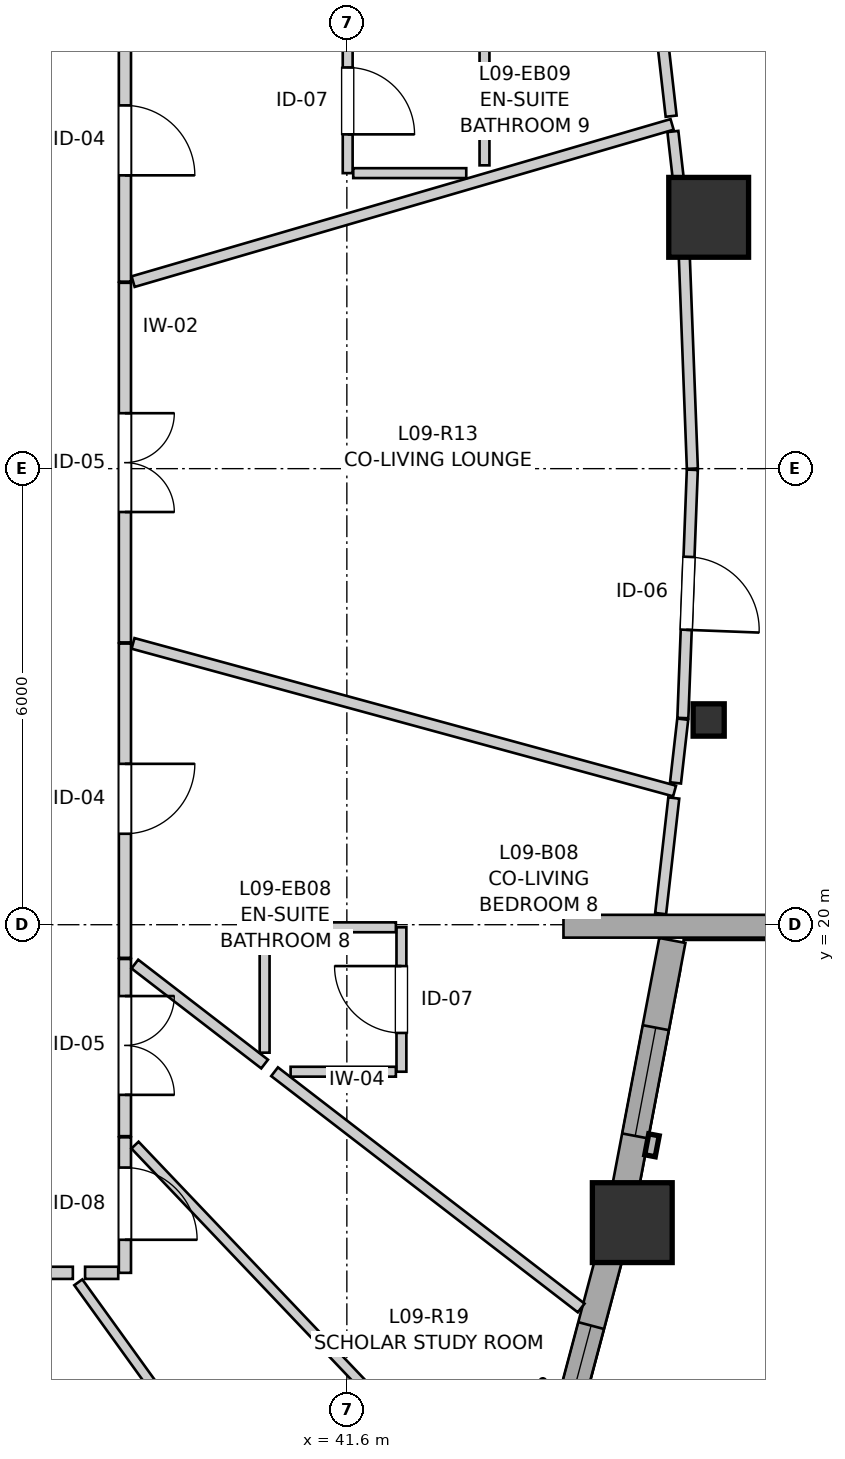
"""IFC4 building model, lengths in metres.
Left out: names, types, materials, properties, quantities, classifications, styles, units other than length and angle.
Written with IfcOpenShell. Run it as: python <this file> out.ifc"""

import sys

from ifc_helpers import new_model, si_unit, direction, frame, frame_2d, origin, origin_2d, place, context, subcontext, project, spatial, rectangle, i_section, extrude, source, transform, mapped, element, fill, save


model = new_model("IFC4")
c1 = context("Model", 3, precision=1e-05, world=origin(), true_north=direction((0.0, 1.0)))
c2 = subcontext(c1, "Body", "Model", "MODEL_VIEW")
j1 = project(units=[si_unit("LENGTHUNIT", "METRE"), si_unit("PLANEANGLEUNIT", "RADIAN")], contexts=[c1])
p1 = place(None, origin())
s1 = spatial("IfcSite", under=j1, at=p1, CompositionType="ELEMENT")
p2 = place(p1, origin())
s2 = spatial("IfcBuilding", under=s1, at=p2, CompositionType="ELEMENT")
p3 = place(p2, frame((0.0, 0.0, 33.4)))
s3 = spatial("IfcBuildingStorey", under=s2, at=p3, CompositionType="ELEMENT", Elevation=33.4)
m1 = source(origin(), c2, "Body", "SweptSolid", [
    extrude(rectangle(XDim=1.05, YDim=1.05, at=origin_2d()), origin(), (0.0, 0.0, 1.0), 2.94),
])
p4 = place(p3, frame((45.355, 16.081, 0.0), z_axis=(0.0, 0.0, 1.0), x_axis=(1.0, 0.0, 0.0)))
e1 = element("IfcColumn", 1, at=p4, inside=s3, PredefinedType="COLUMN", context=c2, shape_type="MappedRepresentation", body=[
    mapped(m1, transform((0.0, 0.0, 0.0), x_axis=(1.0, 0.0, 0.0), y_axis=(0.0, 1.0, 0.0), z_axis=(0.0, 0.0, 1.0), scale=1.0)),
])
m2 = source(origin(), c2, "Body", "SweptSolid", [
    extrude(i_section(OverallWidth=0.409, OverallDepth=0.425, WebThickness=0.03, FlangeThickness=0.048, FilletRadius=0.015, at=origin_2d()), origin(), (0.0, 0.0, 1.0), 2.94),
])
p5 = place(p3, frame((46.361, 22.694, 0.0), z_axis=(0.0, 0.0, 1.0), x_axis=(1.0, 0.0, 0.0)))
e2 = element("IfcColumn", 2, at=p5, inside=s3, PredefinedType="PILASTER", context=c2, shape_type="MappedRepresentation", body=[
    mapped(m2, transform((0.0, 0.0, 0.0), x_axis=(1.0, 0.0, 0.0), y_axis=(0.0, 1.0, 0.0), z_axis=(0.0, 0.0, 1.0), scale=1.0)),
])
p6 = place(p3, frame((46.361, 29.306, 0.0), z_axis=(0.0, 0.0, 1.0), x_axis=(1.0, 0.0, 0.0)))
e3 = element("IfcColumn", 3, at=p6, inside=s3, PredefinedType="COLUMN", context=c2, shape_type="MappedRepresentation", body=[
    mapped(m1, transform((0.0, 0.0, 0.0), x_axis=(1.0, 0.0, 0.0), y_axis=(0.0, 1.0, 0.0), z_axis=(0.0, 0.0, 1.0), scale=1.0)),
])
p7 = place(p3, frame((44.297, 12.782, 0.0), z_axis=(0.0, 0.0, 1.0), x_axis=(0.257090265476, 0.96638739406, 0.0)))
e4 = element("IfcWall", 4, at=p7, inside=s3, PredefinedType="SOLIDWALL", context=c2, shape_type="SweptSolid", body=[
    extrude(rectangle(XDim=3.159, YDim=0.35, at=frame_2d((1.58, 0.0))), origin(), (0.0, 0.0, 1.0), 2.42),
])
p8 = place(p7, frame((0.261, 0.0, 0.82)))
e5 = element("IfcOpeningElement", 5, at=p8, cuts=e4, PredefinedType="OPENING", context=c2, shape_type="SweptSolid", body=[
    extrude(rectangle(XDim=1.75, YDim=1.3, at=frame_2d((0.875, 0.65))), frame((0.0, 0.185, 0.0), z_axis=(0.0, -1.0, 0.0), x_axis=(1.0, 0.0, 0.0)), (0.0, 0.0, 1.0), 0.37),
])
p9 = place(p3, frame((45.24, 16.408, 0.0), z_axis=(0.0, 0.0, 1.0), x_axis=(0.186636709983, 0.982428999209, 0.0)))
e6 = element("IfcWall", 6, at=p9, inside=s3, PredefinedType="SOLIDWALL", context=c2, shape_type="SweptSolid", body=[
    extrude(rectangle(XDim=3.446, YDim=0.35, at=frame_2d((1.723, 0.0))), origin(), (0.0, 0.0, 1.0), 2.42),
])
p10 = place(p9, frame((0.828, 0.0, 0.82)))
e7 = element("IfcOpeningElement", 7, at=p10, cuts=e6, PredefinedType="OPENING", context=c2, shape_type="SweptSolid", body=[
    extrude(rectangle(XDim=1.45, YDim=1.25, at=frame_2d((0.725, 0.625))), frame((0.0, 0.185, 0.0), z_axis=(0.0, -1.0, 0.0), x_axis=(1.0, 0.0, 0.0)), (0.0, 0.0, 1.0), 0.37),
])
p11 = place(p3, frame((44.45, 19.98, 0.0), z_axis=(0.0, 0.0, 1.0), x_axis=(1.0, 0.0, 0.0)))
e8 = element("IfcWall", 8, at=p11, inside=s3, PredefinedType="SOLIDWALL", context=c2, shape_type="SweptSolid", body=[
    extrude(rectangle(XDim=20.685, YDim=0.3, at=frame_2d((10.342, 0.0))), origin(), (0.0, 0.0, 1.0), 2.12),
])
p12 = place(p3, frame((38.68, 28.445, 0.0), z_axis=(0.0, 0.0, 1.0), x_axis=(0.0, -1.0, 0.0)))
e9 = element("IfcWall", 9, at=p12, inside=s3, PredefinedType="PARTITIONING", context=c2, shape_type="SweptSolid", body=[
    extrude(rectangle(XDim=4.731, YDim=0.16, at=frame_2d((2.365, 0.0))), origin(), (0.0, 0.0, 1.0), 2.94),
])
p13 = place(p12, frame((1.716, 0.0, 0.0)))
e10 = element("IfcOpeningElement", 10, at=p13, cuts=e9, PredefinedType="OPENING", context=c2, shape_type="SweptSolid", body=[
    extrude(rectangle(XDim=1.3, YDim=2.1, at=frame_2d((0.65, 1.05))), frame((0.0, 0.09, 0.0), z_axis=(0.0, -1.0, 0.0), x_axis=(1.0, 0.0, 0.0)), (0.0, 0.0, 1.0), 0.18),
])
p14 = place(p3, frame((38.68, 23.699, 0.0), z_axis=(0.0, 0.0, 1.0), x_axis=(0.0, -1.0, 0.0)))
e11 = element("IfcWall", 11, at=p14, inside=s3, PredefinedType="PARTITIONING", context=c2, shape_type="SweptSolid", body=[
    extrude(rectangle(XDim=4.135, YDim=0.16, at=frame_2d((2.067, 0.0))), origin(), (0.0, 0.0, 1.0), 2.94),
])
p15 = place(p14, frame((1.583, 0.0, 0.0)))
e12 = element("IfcOpeningElement", 12, at=p15, cuts=e11, PredefinedType="OPENING", context=c2, shape_type="SweptSolid", body=[
    extrude(rectangle(XDim=0.92, YDim=2.1, at=frame_2d((0.46, 1.05))), frame((0.0, 0.09, 0.0), z_axis=(0.0, -1.0, 0.0), x_axis=(1.0, 0.0, 0.0)), (0.0, 0.0, 1.0), 0.18),
])
p16 = place(p3, frame((38.68, 32.175, 0.0), z_axis=(0.0, 0.0, 1.0), x_axis=(0.0, -1.0, 0.0)))
e13 = element("IfcWall", 13, at=p16, inside=s3, PredefinedType="PARTITIONING", context=c2, shape_type="SweptSolid", body=[
    extrude(rectangle(XDim=3.715, YDim=0.16, at=frame_2d((1.857, 0.0))), origin(), (0.0, 0.0, 1.0), 2.94),
])
p17 = place(p16, frame((1.396, 0.0, 0.0)))
e14 = element("IfcOpeningElement", 14, at=p17, cuts=e13, PredefinedType="OPENING", context=c2, shape_type="SweptSolid", body=[
    extrude(rectangle(XDim=0.92, YDim=2.1, at=frame_2d((0.46, 1.05))), frame((0.0, 0.09, 0.0), z_axis=(0.0, -1.0, 0.0), x_axis=(1.0, 0.0, 0.0)), (0.0, 0.0, 1.0), 0.18),
])
p18 = place(p3, frame((46.146, 25.985, 0.0), z_axis=(0.0, 0.0, 1.0), x_axis=(-0.038094618751, -0.999274136572, 0.0)))
e15 = element("IfcWall", 15, at=p18, inside=s3, PredefinedType="PARTITIONING", context=c2, shape_type="SweptSolid", body=[
    extrude(rectangle(XDim=3.269, YDim=0.145, at=frame_2d((1.634, 0.0))), origin(), (0.0, 0.0, 1.0), 2.408),
])
p19 = place(p18, frame((1.147, 0.0, 0.0)))
e16 = element("IfcOpeningElement", 16, at=p19, cuts=e15, PredefinedType="OPENING", context=c2, shape_type="SweptSolid", body=[
    extrude(rectangle(XDim=0.96, YDim=2.1, at=frame_2d((0.48, 1.05))), frame((0.0, 0.083, 0.0), z_axis=(0.0, -1.0, 0.0), x_axis=(1.0, 0.0, 0.0)), (0.0, 0.0, 1.0), 0.165),
])
p20 = place(p3, frame((37.995, 15.42, 0.0), z_axis=(0.0, 0.0, 1.0), x_axis=(-1.0, 0.0, 0.0)))
e17 = element("IfcWall", 17, at=p20, inside=s3, PredefinedType="PARTITIONING", context=c2, shape_type="SweptSolid", body=[
    extrude(rectangle(XDim=2.9, YDim=0.16, at=frame_2d((1.45, 0.0))), origin(), (0.0, 0.0, 1.0), 2.94),
])
p21 = place(p20, frame((1.014, 0.0, 0.0)))
e18 = element("IfcOpeningElement", 18, at=p21, cuts=e17, PredefinedType="OPENING", context=c2, shape_type="SweptSolid", body=[
    extrude(rectangle(XDim=0.92, YDim=2.1, at=frame_2d((0.46, 1.05))), frame((0.0, 0.09, 0.0), z_axis=(0.0, -1.0, 0.0), x_axis=(1.0, 0.0, 0.0)), (0.0, 0.0, 1.0), 0.18),
])
p22 = place(p3, frame((38.68, 19.549, 0.0), z_axis=(0.0, 0.0, 1.0), x_axis=(0.0, -1.0, 0.0)))
e19 = element("IfcWall", 19, at=p22, inside=s3, PredefinedType="PARTITIONING", context=c2, shape_type="SweptSolid", body=[
    extrude(rectangle(XDim=2.331, YDim=0.16, at=frame_2d((1.166, 0.0))), origin(), (0.0, 0.0, 1.0), 2.94),
])
p23 = place(p22, frame((0.488, 0.0, 0.0)))
e20 = element("IfcOpeningElement", 20, at=p23, cuts=e19, PredefinedType="OPENING", context=c2, shape_type="SweptSolid", body=[
    extrude(rectangle(XDim=1.3, YDim=2.1, at=frame_2d((0.65, 1.05))), frame((0.0, 0.09, 0.0), z_axis=(0.0, -1.0, 0.0), x_axis=(1.0, 0.0, 0.0)), (0.0, 0.0, 1.0), 0.18),
])
p24 = place(p3, frame((42.318, 18.066, 0.0), z_axis=(0.0, 0.0, 1.0), x_axis=(0.0, 1.0, 0.0)))
e21 = element("IfcWall", 21, at=p24, inside=s3, PredefinedType="PARTITIONING", context=c2, shape_type="SweptSolid", body=[
    extrude(rectangle(XDim=1.9, YDim=0.13, at=frame_2d((0.95, 0.0))), origin(), (0.0, 0.0, 1.0), 2.94),
])
p25 = place(p24, frame((0.51, 0.0, 0.0)))
e22 = element("IfcOpeningElement", 22, at=p25, cuts=e21, PredefinedType="OPENING", context=c2, shape_type="SweptSolid", body=[
    extrude(rectangle(XDim=0.88, YDim=2.05, at=frame_2d((0.44, 1.025))), frame((0.0, 0.075, 0.0), z_axis=(0.0, -1.0, 0.0), x_axis=(1.0, 0.0, 0.0)), (0.0, 0.0, 1.0), 0.15),
])
p26 = place(p3, frame((41.611, 31.788, 0.0), z_axis=(0.0, 0.0, 1.0), x_axis=(0.0, -1.0, 0.0)))
e23 = element("IfcWall", 23, at=p26, inside=s3, PredefinedType="PARTITIONING", context=c2, shape_type="SweptSolid", body=[
    extrude(rectangle(XDim=1.9, YDim=0.13, at=frame_2d((0.95, 0.0))), origin(), (0.0, 0.0, 1.0), 2.94),
])
p27 = place(p26, frame((0.51, 0.0, 0.0)))
e24 = element("IfcOpeningElement", 24, at=p27, cuts=e23, PredefinedType="OPENING", context=c2, shape_type="SweptSolid", body=[
    extrude(rectangle(XDim=0.88, YDim=2.05, at=frame_2d((0.44, 1.025))), frame((0.0, 0.075, 0.0), z_axis=(0.0, -1.0, 0.0), x_axis=(1.0, 0.0, 0.0)), (0.0, 0.0, 1.0), 0.15),
])
p28 = place(p3, frame((38.68, 17.203, 0.0), z_axis=(0.0, 0.0, 1.0), x_axis=(0.0, -1.0, 0.0)))
e25 = element("IfcWall", 25, at=p28, inside=s3, PredefinedType="PARTITIONING", context=c2, shape_type="SweptSolid", body=[
    extrude(rectangle(XDim=1.783, YDim=0.16, at=frame_2d((0.892, 0.0))), origin(), (0.0, 0.0, 1.0), 2.94),
])
p29 = place(p28, frame((0.398, 0.0, 0.0)))
e26 = element("IfcOpeningElement", 26, at=p29, cuts=e25, PredefinedType="OPENING", context=c2, shape_type="SweptSolid", body=[
    extrude(rectangle(XDim=0.95, YDim=2.1, at=frame_2d((0.475, 1.05))), frame((0.0, 0.09, 0.0), z_axis=(0.0, -1.0, 0.0), x_axis=(1.0, 0.0, 0.0)), (0.0, 0.0, 1.0), 0.18),
])
p30 = place(p3, frame((38.067, 15.295, 0.0), z_axis=(0.0, 0.0, 1.0), x_axis=(0.584777320582, -0.811193864211, 0.0)))
e27 = element("IfcWall", 27, at=p30, inside=s3, PredefinedType="PARTITIONING", context=c2, shape_type="SweptSolid", body=[
    extrude(rectangle(XDim=8.164, YDim=0.13, at=frame_2d((4.082, 0.0))), origin(), (0.0, 0.0, 1.0), 2.94),
])
p31 = place(p3, frame((38.788, 28.46, 0.0), z_axis=(0.0, 0.0, 1.0), x_axis=(0.959983709987, 0.280055845432, 0.0)))
e28 = element("IfcWall", 28, at=p31, inside=s3, PredefinedType="PARTITIONING", context=c2, shape_type="SweptSolid", body=[
    extrude(rectangle(XDim=7.386, YDim=0.145, at=frame_2d((3.693, 0.0))), origin(), (0.0, 0.0, 1.0), 2.94),
])
p32 = place(p3, frame((38.787, 23.701, 0.0), z_axis=(0.0, 0.0, 1.0), x_axis=(0.964810342249, -0.262946769308, 0.0)))
e29 = element("IfcWall", 29, at=p32, inside=s3, PredefinedType="PARTITIONING", context=c2, shape_type="SweptSolid", body=[
    extrude(rectangle(XDim=7.385, YDim=0.145, at=frame_2d((3.692, 0.0))), origin(), (0.0, 0.0, 1.0), 2.94),
])
p33 = place(p3, frame((38.812, 17.101, 0.0), z_axis=(0.0, 0.0, 1.0), x_axis=(0.689140556814, -0.724627692649, 0.0)))
e30 = element("IfcWall", 30, at=p33, inside=s3, PredefinedType="PARTITIONING", context=c2, shape_type="SweptSolid", body=[
    extrude(rectangle(XDim=7.217, YDim=0.13, at=frame_2d((3.608, 0.0))), origin(), (0.0, 0.0, 1.0), 2.94),
])
p34 = place(p3, frame((40.649, 18.066, 0.0), z_axis=(0.0, 0.0, 1.0), x_axis=(0.792155051101, -0.610319895641, 0.0)))
e31 = element("IfcWall", 31, at=p34, inside=s3, PredefinedType="PARTITIONING", context=c2, shape_type="SweptSolid", body=[
    extrude(rectangle(XDim=5.093, YDim=0.145, at=frame_2d((2.546, 0.0))), origin(), (0.0, 0.0, 1.0), 2.94),
])
p35 = place(p3, frame((46.021, 29.281, 0.0), z_axis=(0.0, 0.0, 1.0), x_axis=(0.038070453861, -0.999275057501, 0.0)))
e32 = element("IfcWall", 32, at=p35, inside=s3, PredefinedType="PARTITIONING", context=c2, shape_type="SweptSolid", body=[
    extrude(rectangle(XDim=3.283, YDim=0.145, at=frame_2d((1.642, 0.0))), origin(), (0.0, 0.0, 1.0), 2.408),
])
p36 = place(p3, frame((38.811, 19.482, 0.0), z_axis=(0.0, 0.0, 1.0), x_axis=(0.792185877025, -0.61027988353, 0.0)))
e33 = element("IfcWall", 33, at=p36, inside=s3, PredefinedType="PARTITIONING", context=c2, shape_type="SweptSolid", body=[
    extrude(rectangle(XDim=2.156, YDim=0.145, at=frame_2d((1.078, 0.0))), origin(), (0.0, 0.0, 1.0), 2.94),
])
p37 = place(p3, frame((43.411, 29.99, 0.0), z_axis=(0.0, 0.0, 1.0), x_axis=(0.0, 1.0, 0.0)))
e34 = element("IfcWall", 34, at=p37, inside=s3, PredefinedType="PARTITIONING", context=c2, shape_type="SweptSolid", body=[
    extrude(rectangle(XDim=1.798, YDim=0.13, at=frame_2d((0.899, 0.0))), origin(), (0.0, 0.0, 1.0), 2.94),
])
p38 = place(p3, frame((41.684, 29.888, 0.0), z_axis=(0.0, 0.0, 1.0), x_axis=(1.0, 0.0, 0.0)))
e35 = element("IfcWall", 35, at=p38, inside=s3, PredefinedType="PARTITIONING", context=c2, shape_type="SweptSolid", body=[
    extrude(rectangle(XDim=1.487, YDim=0.13, at=frame_2d((0.743, 0.0))), origin(), (0.0, 0.0, 1.0), 2.94),
])
p39 = place(p3, frame((40.518, 19.966, 0.0), z_axis=(0.0, 0.0, 1.0), x_axis=(1.0, 0.0, 0.0)))
e36 = element("IfcWall", 36, at=p39, inside=s3, PredefinedType="PARTITIONING", context=c2, shape_type="SweptSolid", body=[
    extrude(rectangle(XDim=1.727, YDim=0.13, at=frame_2d((0.864, 0.0))), origin(), (0.0, 0.0, 1.0), 2.108),
])
p40 = place(p3, frame((40.518, 18.317, 0.0), z_axis=(0.0, 0.0, 1.0), x_axis=(0.0, 1.0, 0.0)))
e37 = element("IfcWall", 37, at=p40, inside=s3, PredefinedType="PARTITIONING", context=c2, shape_type="SweptSolid", body=[
    extrude(rectangle(XDim=1.576, YDim=0.13, at=frame_2d((0.788, 0.0))), origin(), (0.0, 0.0, 1.0), 2.94),
])
p41 = place(p3, frame((40.86, 18.066, 0.0), z_axis=(0.0, 0.0, 1.0), x_axis=(1.0, 0.0, 0.0)))
e38 = element("IfcWall", 38, at=p41, inside=s3, PredefinedType="PARTITIONING", context=c2, shape_type="SweptSolid", body=[
    extrude(rectangle(XDim=1.385, YDim=0.13, at=frame_2d((0.692, 0.0))), origin(), (0.0, 0.0, 1.0), 2.94),
])
p42 = place(p3, frame((45.729, 20.146, 0.0), z_axis=(0.0, 0.0, 1.0), x_axis=(0.113074294354, 0.993586535716, 0.0)))
e39 = element("IfcWall", 39, at=p42, inside=s3, PredefinedType="PARTITIONING", context=c2, shape_type="SweptSolid", body=[
    extrude(rectangle(XDim=1.531, YDim=0.145, at=frame_2d((0.765, 0.0))), origin(), (0.0, 0.0, 1.0), 2.408),
])
p43 = place(p3, frame((45.89, 30.436, 0.0), z_axis=(0.0, 0.0, 1.0), x_axis=(0.113024308153, -0.993592223081, 0.0)))
e40 = element("IfcWall", 40, at=p43, inside=s3, PredefinedType="PARTITIONING", context=c2, shape_type="SweptSolid", body=[
    extrude(rectangle(XDim=1.147, YDim=0.145, at=frame_2d((0.573, 0.0))), origin(), (0.0, 0.0, 1.0), 2.408),
])
p44 = place(p3, frame((45.729, 31.854, 0.0), z_axis=(0.0, 0.0, 1.0), x_axis=(0.112860473391, -0.993610846129, 0.0)))
e41 = element("IfcWall", 41, at=p44, inside=s3, PredefinedType="PARTITIONING", context=c2, shape_type="SweptSolid", body=[
    extrude(rectangle(XDim=1.224, YDim=0.145, at=frame_2d((0.612, 0.0))), origin(), (0.0, 0.0, 1.0), 2.408),
])
p45 = place(p3, frame((45.924, 21.866, 0.0), z_axis=(0.0, 0.0, 1.0), x_axis=(0.112844765803, 0.993612630169, 0.0)))
e42 = element("IfcWall", 42, at=p45, inside=s3, PredefinedType="PARTITIONING", context=c2, shape_type="SweptSolid", body=[
    extrude(rectangle(XDim=0.844, YDim=0.145, at=frame_2d((0.422, 0.0))), origin(), (0.0, 0.0, 1.0), 2.408),
])
p46 = place(p3, frame((38.156, 15.42, 0.0), z_axis=(0.0, 0.0, 1.0), x_axis=(1.0, 0.0, 0.0)))
e43 = element("IfcWall", 43, at=p46, inside=s3, PredefinedType="PARTITIONING", context=c2, shape_type="SweptSolid", body=[
    extrude(rectangle(XDim=0.436, YDim=0.16, at=frame_2d((0.218, 0.0))), origin(), (0.0, 0.0, 1.0), 2.94),
])
m3 = source(origin(), c2, "Body", "SweptSolid", [
    extrude(rectangle(XDim=1.75, YDim=1.3, at=frame_2d((0.875, 0.65))), frame((0.0, 0.03, 0.0), z_axis=(0.0, -1.0, 0.0), x_axis=(1.0, 0.0, 0.0)), (0.0, 0.0, 1.0), 0.06),
])
p47 = place(p8, origin())
e44 = element("IfcWindow", 44, at=p47, inside=s3, PartitioningType="SINGLE_PANEL", PredefinedType="WINDOW", context=c2, shape_type="MappedRepresentation", body=[
    mapped(m3, transform((0.0, 0.0, 0.0), x_axis=(1.0, 0.0, 0.0), y_axis=(0.0, 1.0, 0.0), z_axis=(0.0, 0.0, 1.0), scale=1.0)),
])
fill(e5, e44)
m4 = source(origin(), c2, "Body", "SweptSolid", [
    extrude(rectangle(XDim=1.45, YDim=1.25, at=frame_2d((0.725, 0.625))), frame((0.0, 0.03, 0.0), z_axis=(0.0, -1.0, 0.0), x_axis=(1.0, 0.0, 0.0)), (0.0, 0.0, 1.0), 0.06),
])
p48 = place(p10, origin())
e45 = element("IfcWindow", 45, at=p48, inside=s3, PartitioningType="SINGLE_PANEL", PredefinedType="WINDOW", context=c2, shape_type="MappedRepresentation", body=[
    mapped(m4, transform((0.0, 0.0, 0.0), x_axis=(1.0, 0.0, 0.0), y_axis=(0.0, 1.0, 0.0), z_axis=(0.0, 0.0, 1.0), scale=1.0)),
])
fill(e7, e45)
m5 = source(origin(), c2, "Body", "SweptSolid", [
    extrude(rectangle(XDim=1.3, YDim=2.1, at=frame_2d((0.65, 1.05))), frame((0.0, 0.025, 0.0), z_axis=(0.0, -1.0, 0.0), x_axis=(1.0, 0.0, 0.0)), (0.0, 0.0, 1.0), 0.05),
])
p49 = place(p13, origin())
e46 = element("IfcDoor", 46, at=p49, inside=s3, OperationType="DOUBLE_DOOR_SINGLE_SWING", PredefinedType="DOOR", context=c2, shape_type="MappedRepresentation", body=[
    mapped(m5, transform((0.0, 0.0, 0.0), x_axis=(1.0, 0.0, 0.0), y_axis=(0.0, 1.0, 0.0), z_axis=(0.0, 0.0, 1.0), scale=1.0)),
])
fill(e10, e46)
m6 = source(origin(), c2, "Body", "SweptSolid", [
    extrude(rectangle(XDim=0.92, YDim=2.1, at=frame_2d((0.46, 1.05))), frame((0.0, 0.025, 0.0), z_axis=(0.0, -1.0, 0.0), x_axis=(1.0, 0.0, 0.0)), (0.0, 0.0, 1.0), 0.05),
])
p50 = place(p15, origin())
e47 = element("IfcDoor", 47, at=p50, inside=s3, OperationType="SINGLE_SWING_LEFT", PredefinedType="DOOR", context=c2, shape_type="MappedRepresentation", body=[
    mapped(m6, transform((0.0, 0.0, 0.0), x_axis=(1.0, 0.0, 0.0), y_axis=(0.0, 1.0, 0.0), z_axis=(0.0, 0.0, 1.0), scale=1.0)),
])
fill(e12, e47)
p51 = place(p17, origin())
e48 = element("IfcDoor", 48, at=p51, inside=s3, OperationType="SINGLE_SWING_RIGHT", PredefinedType="DOOR", context=c2, shape_type="MappedRepresentation", body=[
    mapped(m6, transform((0.0, 0.0, 0.0), x_axis=(1.0, 0.0, 0.0), y_axis=(0.0, 1.0, 0.0), z_axis=(0.0, 0.0, 1.0), scale=1.0)),
])
fill(e14, e48)
m7 = source(origin(), c2, "Body", "SweptSolid", [
    extrude(rectangle(XDim=0.96, YDim=2.1, at=frame_2d((0.48, 1.05))), frame((0.0, 0.025, 0.0), z_axis=(0.0, -1.0, 0.0), x_axis=(1.0, 0.0, 0.0)), (0.0, 0.0, 1.0), 0.05),
])
p52 = place(p19, origin())
e49 = element("IfcDoor", 49, at=p52, inside=s3, OperationType="SINGLE_SWING_RIGHT", PredefinedType="DOOR", context=c2, shape_type="MappedRepresentation", body=[
    mapped(m7, transform((0.0, 0.0, 0.0), x_axis=(1.0, 0.0, 0.0), y_axis=(0.0, 1.0, 0.0), z_axis=(0.0, 0.0, 1.0), scale=1.0)),
])
fill(e16, e49)
p53 = place(p23, origin())
e50 = element("IfcDoor", 50, at=p53, inside=s3, OperationType="DOUBLE_DOOR_SINGLE_SWING", PredefinedType="DOOR", context=c2, shape_type="MappedRepresentation", body=[
    mapped(m5, transform((0.0, 0.0, 0.0), x_axis=(1.0, 0.0, 0.0), y_axis=(0.0, 1.0, 0.0), z_axis=(0.0, 0.0, 1.0), scale=1.0)),
])
fill(e20, e50)
m8 = source(origin(), c2, "Body", "SweptSolid", [
    extrude(rectangle(XDim=0.88, YDim=2.05, at=frame_2d((0.44, 1.025))), frame((0.0, 0.025, 0.0), z_axis=(0.0, -1.0, 0.0), x_axis=(1.0, 0.0, 0.0)), (0.0, 0.0, 1.0), 0.05),
])
p54 = place(p25, origin())
e51 = element("IfcDoor", 51, at=p54, inside=s3, OperationType="SINGLE_SWING_RIGHT", PredefinedType="DOOR", context=c2, shape_type="MappedRepresentation", body=[
    mapped(m8, transform((0.0, 0.0, 0.0), x_axis=(1.0, 0.0, 0.0), y_axis=(0.0, 1.0, 0.0), z_axis=(0.0, 0.0, 1.0), scale=1.0)),
])
fill(e22, e51)
p55 = place(p27, origin())
e52 = element("IfcDoor", 52, at=p55, inside=s3, OperationType="SINGLE_SWING_RIGHT", PredefinedType="DOOR", context=c2, shape_type="MappedRepresentation", body=[
    mapped(m8, transform((0.0, 0.0, 0.0), x_axis=(1.0, 0.0, 0.0), y_axis=(0.0, 1.0, 0.0), z_axis=(0.0, 0.0, 1.0), scale=1.0)),
])
fill(e24, e52)
m9 = source(origin(), c2, "Body", "SweptSolid", [
    extrude(rectangle(XDim=0.95, YDim=2.1, at=frame_2d((0.475, 1.05))), frame((0.0, 0.025, 0.0), z_axis=(0.0, -1.0, 0.0), x_axis=(1.0, 0.0, 0.0)), (0.0, 0.0, 1.0), 0.05),
])
p56 = place(p29, origin())
e53 = element("IfcDoor", 53, at=p56, inside=s3, OperationType="SINGLE_SWING_RIGHT", PredefinedType="DOOR", context=c2, shape_type="MappedRepresentation", body=[
    mapped(m9, transform((0.0, 0.0, 0.0), x_axis=(1.0, 0.0, 0.0), y_axis=(0.0, 1.0, 0.0), z_axis=(0.0, 0.0, 1.0), scale=1.0)),
])
fill(e26, e53)
save(model, sys.argv[1])
